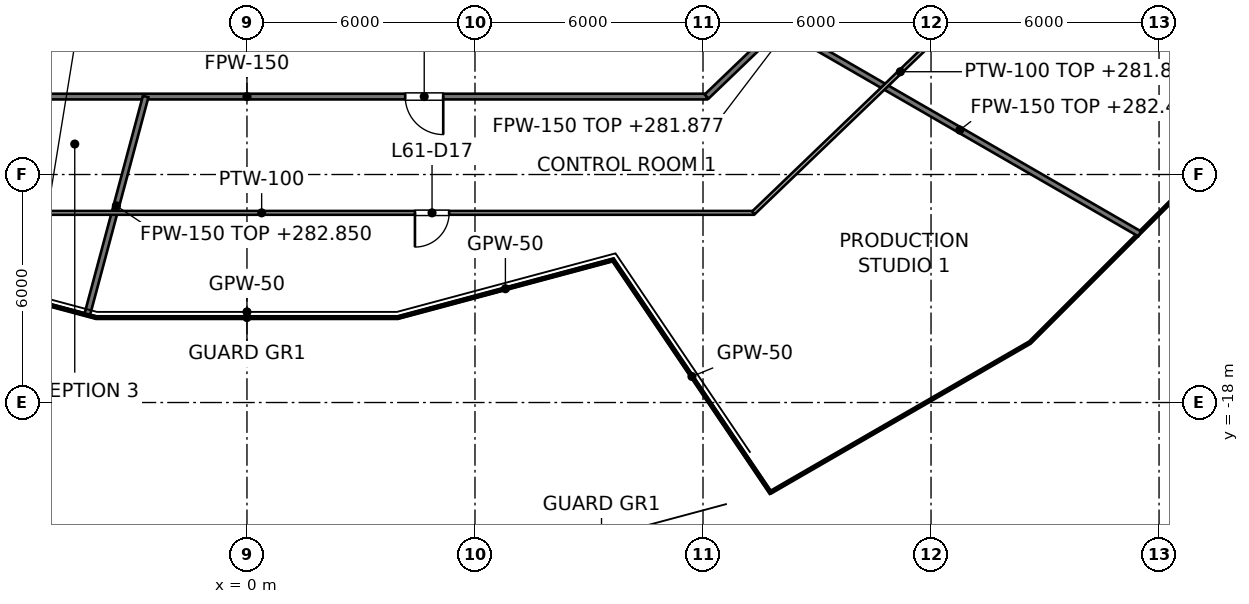
"""IFC4 building model, lengths in metres.
Left out: names, types, materials, properties, quantities, classifications, styles, units other than length and angle.
Written with IfcOpenShell. Run it as: python <this file> out.ifc"""

import sys

from ifc_helpers import new_model, si_unit, direction, frame, frame_2d, origin, place, context, subcontext, project, spatial, rectangle, extrude, element, fill, save


model = new_model("IFC4")
c1 = context("Model", 3, precision=1e-05, world=origin(), true_north=direction((0.0, 1.0)))
c2 = subcontext(c1, "Body", "Model", "MODEL_VIEW")
j1 = project(units=[si_unit("LENGTHUNIT", "METRE"), si_unit("PLANEANGLEUNIT", "RADIAN")], contexts=[c1])
p1 = place(None, origin())
s1 = spatial("IfcSite", under=j1, at=p1, CompositionType="ELEMENT")
p2 = place(p1, origin())
s2 = spatial("IfcBuilding", under=s1, at=p2, CompositionType="ELEMENT")
p3 = place(p2, frame((0.0, 0.0, 279.0)))
s3 = spatial("IfcBuildingStorey", under=s2, at=p3, CompositionType="ELEMENT", Elevation=279.0)
p4 = place(p3, frame((14.024, -8.097, 0.0), z_axis=(0.0, 0.0, 1.0), x_axis=(0.866031225993, -0.499989915504, 0.0)))
e1 = element("IfcWall", 1, at=p4, inside=s3, PredefinedType="PARTITIONING", context=c2, shape_type="SweptSolid", body=[
    extrude(rectangle(XDim=10.93, YDim=0.15, at=frame_2d((5.465, 0.0))), origin(), (0.0, 0.0, 1.0), 3.425),
])
p5 = place(p3, frame((-12.095, -9.949, 0.0), z_axis=(0.0, 0.0, 1.0), x_axis=(1.0, 0.0, 0.0)))
e2 = element("IfcWall", 2, at=p5, inside=s3, PredefinedType="PARTITIONING", context=c2, shape_type="SweptSolid", body=[
    extrude(rectangle(XDim=24.19, YDim=0.15, at=frame_2d((12.095, 0.0))), origin(), (0.0, 0.0, 1.0), 2.927),
])
p6 = place(p5, frame((16.259, 0.0, 0.0)))
e3 = element("IfcOpeningElement", 3, at=p6, cuts=e2, PredefinedType="OPENING", context=c2, shape_type="SweptSolid", body=[
    extrude(rectangle(XDim=1.0, YDim=2.1, at=frame_2d((0.5, 1.05))), frame((0.0, 0.075, 0.0), z_axis=(0.0, -1.0, 0.0), x_axis=(1.0, 0.0, 0.0)), (0.0, 0.0, 1.0), 0.15),
])
p7 = place(p5, frame((1.016, 0.0, 0.0)))
e4 = element("IfcOpeningElement", 4, at=p7, cuts=e2, PredefinedType="OPENING", context=c2, shape_type="SweptSolid", body=[
    extrude(rectangle(XDim=1.0, YDim=2.1, at=frame_2d((0.5, 1.05))), frame((0.0, 0.075, 0.0), z_axis=(0.0, -1.0, 0.0), x_axis=(1.0, 0.0, 0.0)), (0.0, 0.0, 1.0), 0.15),
])
p8 = place(p5, frame((5.783, 0.0, 0.0)))
e5 = element("IfcOpeningElement", 5, at=p8, cuts=e2, PredefinedType="OPENING", context=c2, shape_type="SweptSolid", body=[
    extrude(rectangle(XDim=1.0, YDim=2.1, at=frame_2d((0.5, 1.05))), frame((0.0, 0.075, 0.0), z_axis=(0.0, -1.0, 0.0), x_axis=(1.0, 0.0, 0.0)), (0.0, 0.0, 1.0), 0.15),
])
p9 = place(p3, frame((12.095, -9.949, 0.0), z_axis=(0.0, 0.0, 1.0), x_axis=(0.721290181137, 0.692633001376, 0.0)))
e6 = element("IfcWall", 6, at=p9, inside=s3, PredefinedType="PARTITIONING", context=c2, shape_type="SweptSolid", body=[
    extrude(rectangle(XDim=8.187, YDim=0.15, at=frame_2d((4.094, 0.0))), origin(), (0.0, 0.0, 1.0), 2.877),
])
p10 = place(p9, frame((3.542, 0.0, 0.0)))
e7 = element("IfcOpeningElement", 7, at=p10, cuts=e6, PredefinedType="OPENING", context=c2, shape_type="SweptSolid", body=[
    extrude(rectangle(XDim=1.0, YDim=2.1, at=frame_2d((0.5, 1.05))), frame((0.0, 0.075, 0.0), z_axis=(0.0, -1.0, 0.0), x_axis=(1.0, 0.0, 0.0)), (0.0, 0.0, 1.0), 0.15),
])
p11 = place(p3, frame((-4.207, -15.701, 0.0), z_axis=(0.0, 0.0, 1.0), x_axis=(0.258785268971, 0.965934875943, 0.0)))
e8 = element("IfcWall", 8, at=p11, inside=s3, PredefinedType="PARTITIONING", context=c2, shape_type="SweptSolid", body=[
    extrude(rectangle(XDim=5.955, YDim=0.15, at=frame_2d((2.978, 0.0))), origin(), (0.0, 0.0, 1.0), 3.85),
])
p12 = place(p3, frame((9.634, -14.247, 0.0), z_axis=(0.0, 0.0, 1.0), x_axis=(0.560195620851, -0.828360348145, 0.0)))
e9 = element("IfcWall", 9, at=p12, inside=s3, PredefinedType="PARTITIONING", context=c2, shape_type="SweptSolid", body=[
    extrude(rectangle(XDim=7.406, YDim=0.05, at=frame_2d((3.703, 0.0))), origin(), (0.0, 0.0, 1.0), 2.927),
])
p13 = place(p3, frame((-11.081, -13.859, 0.0), z_axis=(0.0, 0.0, 1.0), x_axis=(0.966075753544, -0.258258859314, 0.0)))
e10 = element("IfcWall", 10, at=p13, inside=s3, PredefinedType="PARTITIONING", context=c2, shape_type="SweptSolid", body=[
    extrude(rectangle(XDim=7.365, YDim=0.05, at=frame_2d((3.683, 0.0))), origin(), (0.0, 0.0, 1.0), 2.927),
])
p14 = place(p3, frame((-3.967, -15.765, 0.0), z_axis=(0.0, 0.0, 1.0), x_axis=(1.0, 0.0, 0.0)))
e11 = element("IfcWall", 11, at=p14, inside=s3, PredefinedType="PARTITIONING", context=c2, shape_type="SweptSolid", body=[
    extrude(rectangle(XDim=7.934, YDim=0.05, at=frame_2d((3.967, 0.0))), origin(), (0.0, 0.0, 1.0), 2.927),
])
p15 = place(p3, frame((3.967, -15.765, 0.0), z_axis=(0.0, 0.0, 1.0), x_axis=(0.965953251559, 0.258716670901, 0.0)))
e12 = element("IfcWall", 12, at=p15, inside=s3, PredefinedType="PARTITIONING", context=c2, shape_type="SweptSolid", body=[
    extrude(rectangle(XDim=5.867, YDim=0.05, at=frame_2d((2.933, 0.0))), origin(), (0.0, 0.0, 1.0), 2.927),
])
p16 = place(p3, frame((-12.553, -13.009, 0.0), z_axis=(0.0, 0.0, 1.0), x_axis=(1.0, 0.0, 0.0)))
e13 = element("IfcWall", 13, at=p16, inside=s3, PredefinedType="PARTITIONING", context=c2, shape_type="SweptSolid", body=[
    extrude(rectangle(XDim=25.879, YDim=0.1, at=frame_2d((12.939, 0.0))), origin(), (0.0, 0.0, 1.0), 2.927),
])
p17 = place(p16, frame((16.973, 0.0, 0.0)))
e14 = element("IfcOpeningElement", 14, at=p17, cuts=e13, PredefinedType="OPENING", context=c2, shape_type="SweptSolid", body=[
    extrude(rectangle(XDim=0.9, YDim=2.1, at=frame_2d((0.45, 1.05))), frame((0.0, 0.05, 0.0), z_axis=(0.0, -1.0, 0.0), x_axis=(1.0, 0.0, 0.0)), (0.0, 0.0, 1.0), 0.1),
])
p18 = place(p16, frame((4.554, 0.0, 0.0)))
e15 = element("IfcOpeningElement", 15, at=p18, cuts=e13, PredefinedType="OPENING", context=c2, shape_type="SweptSolid", body=[
    extrude(rectangle(XDim=0.9, YDim=2.1, at=frame_2d((0.45, 1.05))), frame((0.0, 0.05, 0.0), z_axis=(0.0, -1.0, 0.0), x_axis=(1.0, 0.0, 0.0)), (0.0, 0.0, 1.0), 0.1),
])
p19 = place(p3, frame((13.326, -13.009, 0.0), z_axis=(0.0, 0.0, 1.0), x_axis=(0.721216222175, 0.692710012106, 0.0)))
e16 = element("IfcWall", 16, at=p19, inside=s3, PredefinedType="PARTITIONING", context=c2, shape_type="SweptSolid", body=[
    extrude(rectangle(XDim=10.723, YDim=0.1, at=frame_2d((5.361, 0.0))), origin(), (0.0, 0.0, 1.0), 2.877),
])
p20 = place(p6, origin())
e17 = element("IfcDoor", 17, at=p20, inside=s3, OperationType="SINGLE_SWING_RIGHT", PredefinedType="DOOR", context=c2, shape_type="SweptSolid", body=[
    extrude(rectangle(XDim=1.0, YDim=2.1, at=frame_2d((0.5, 1.05))), frame((0.0, 0.025, 0.0), z_axis=(0.0, -1.0, 0.0), x_axis=(1.0, 0.0, 0.0)), (0.0, 0.0, 1.0), 0.05),
])
fill(e3, e17)
p21 = place(p17, origin())
e18 = element("IfcDoor", 18, at=p21, inside=s3, OperationType="SINGLE_SWING_LEFT", PredefinedType="DOOR", context=c2, shape_type="SweptSolid", body=[
    extrude(rectangle(XDim=0.9, YDim=2.1, at=frame_2d((0.45, 1.05))), frame((0.0, 0.025, 0.0), z_axis=(0.0, -1.0, 0.0), x_axis=(1.0, 0.0, 0.0)), (0.0, 0.0, 1.0), 0.05),
])
fill(e14, e18)
save(model, sys.argv[1])
